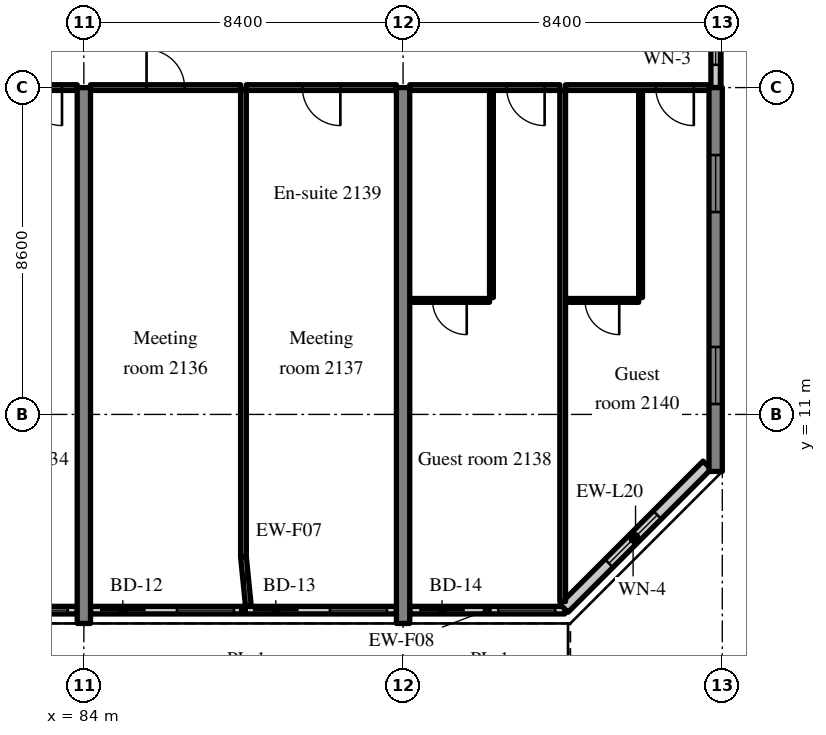
"""IFC4 building model, lengths in metres.
Left out: names, types, materials, properties, quantities, classifications, styles, units other than length and angle.
Written with IfcOpenShell. Run it as: python <this file> out.ifc"""

import sys

from ifc_helpers import new_model, si_unit, direction, frame, frame_2d, origin, place, context, subcontext, project, spatial, rectangle, extrude, source, transform, mapped, element, fill, save


model = new_model("IFC4")
c1 = context("Model", 3, precision=1e-05, world=origin(), true_north=direction((0.0, 1.0)))
c2 = subcontext(c1, "Body", "Model", "MODEL_VIEW")
j1 = project(units=[si_unit("LENGTHUNIT", "METRE"), si_unit("PLANEANGLEUNIT", "RADIAN")], contexts=[c1])
p1 = place(None, origin())
s1 = spatial("IfcSite", under=j1, at=p1, CompositionType="ELEMENT")
p2 = place(p1, origin())
s2 = spatial("IfcBuilding", under=s1, at=p2, CompositionType="ELEMENT")
p3 = place(p2, frame((0.0, 0.0, 91.4)))
s3 = spatial("IfcBuildingStorey", under=s2, at=p3, CompositionType="ELEMENT", Elevation=91.4)
m1 = source(origin(), c2, "Body", "SweptSolid", [
    extrude(rectangle(XDim=14.1, YDim=0.35, at=frame_2d((7.05, 0.0))), origin(), (0.0, 0.0, 1.0), 3.52),
])
for number, where, z_axis, x_axis in (
    (1, (84.0, 5.5, 0.0), (0.0, 0.0, 1.0), (0.0, 1.0, 0.0)),
    (2, (92.4, 5.5, 0.0), (0.0, 0.0, 1.0), (0.0, 1.0, 0.0)),
):
    element("IfcWall", number, at=place(p3, frame(where, z_axis=z_axis, x_axis=x_axis)), inside=s3, PredefinedType="SHEAR", context=c2, shape_type="MappedRepresentation", body=[
        mapped(m1, transform((0.0, 0.0, 0.0), scale=1.0)),
    ])
m2 = source(origin(), c2, "Body", "SweptSolid", [
    extrude(rectangle(XDim=10.1, YDim=0.35, at=frame_2d((5.05, 0.0))), origin(), (0.0, 0.0, 1.0), 3.52),
])
p4 = place(p3, frame((100.625, 9.5, 0.0), z_axis=(0.0, 0.0, 1.0), x_axis=(0.0, 1.0, 0.0)))
e3 = element("IfcWall", 3, at=p4, inside=s3, PredefinedType="SHEAR", context=c2, shape_type="MappedRepresentation", body=[
    mapped(m2, transform((0.0, 0.0, 0.0), scale=1.0)),
])
m3 = source(origin(), c2, "Body", "SweptSolid", [
    extrude(rectangle(XDim=1.5, YDim=1.5, at=frame_2d((0.75, 0.75))), frame((0.0, 0.185, 0.0), z_axis=(0.0, -1.0, 0.0), x_axis=(1.0, 0.0, 0.0)), (0.0, 0.0, 1.0), 0.37),
])
p5 = place(p4, frame((1.775, 0.0, 0.9)))
e4 = element("IfcOpeningElement", 4, at=p5, cuts=e3, PredefinedType="OPENING", context=c2, shape_type="MappedRepresentation", body=[
    mapped(m3, transform((0.0, 0.0, 0.0), scale=1.0)),
])
p6 = place(p4, frame((6.825, 0.0, 0.9)))
e5 = element("IfcOpeningElement", 5, at=p6, cuts=e3, PredefinedType="OPENING", context=c2, shape_type="MappedRepresentation", body=[
    mapped(m3, transform((0.0, 0.0, 0.0), scale=1.0)),
])
m4 = source(origin(), c2, "Body", "SweptSolid", [
    extrude(rectangle(XDim=8.05, YDim=0.2, at=frame_2d((4.025, 0.0))), origin(), (0.0, 0.0, 1.0), 2.82),
])
p7 = place(p3, frame((75.775, 5.85, 0.0), z_axis=(0.0, 0.0, 1.0), x_axis=(1.0, 0.0, 0.0)))
e6 = element("IfcWall", 6, at=p7, inside=s3, PredefinedType="SOLIDWALL", context=c2, shape_type="MappedRepresentation", body=[
    mapped(m4, transform((0.0, 0.0, 0.0), scale=1.0)),
])
m5 = source(origin(), c2, "Body", "SweptSolid", [
    extrude(rectangle(XDim=1.2, YDim=2.4, at=frame_2d((0.6, 1.2))), frame((0.0, 0.11, 0.0), z_axis=(0.0, -1.0, 0.0), x_axis=(1.0, 0.0, 0.0)), (0.0, 0.0, 1.0), 0.22),
])
p8 = place(p7, frame((0.25, 0.0, 0.0)))
e7 = element("IfcOpeningElement", 7, at=p8, cuts=e6, PredefinedType="OPENING", context=c2, shape_type="MappedRepresentation", body=[
    mapped(m5, transform((0.0, 0.0, 0.0), scale=1.0)),
])
m6 = source(origin(), c2, "Body", "SweptSolid", [
    extrude(rectangle(XDim=1.5, YDim=1.5, at=frame_2d((0.75, 0.75))), frame((0.0, 0.11, 0.0), z_axis=(0.0, -1.0, 0.0), x_axis=(1.0, 0.0, 0.0)), (0.0, 0.0, 1.0), 0.22),
])
p9 = place(p7, frame((2.275, 0.0, 0.9)))
e8 = element("IfcOpeningElement", 8, at=p9, cuts=e6, PredefinedType="OPENING", context=c2, shape_type="MappedRepresentation", body=[
    mapped(m6, transform((0.0, 0.0, 0.0), scale=1.0)),
])
p10 = place(p7, frame((4.275, 0.0, 0.0)))
e9 = element("IfcOpeningElement", 9, at=p10, cuts=e6, PredefinedType="OPENING", context=c2, shape_type="MappedRepresentation", body=[
    mapped(m5, transform((0.0, 0.0, 0.0), scale=1.0)),
])
p11 = place(p7, frame((6.3, 0.0, 0.9)))
e10 = element("IfcOpeningElement", 10, at=p11, cuts=e6, PredefinedType="OPENING", context=c2, shape_type="MappedRepresentation", body=[
    mapped(m6, transform((0.0, 0.0, 0.0), scale=1.0)),
])
p12 = place(p3, frame((84.175, 5.85, 0.0), z_axis=(0.0, 0.0, 1.0), x_axis=(1.0, 0.0, 0.0)))
e11 = element("IfcWall", 11, at=p12, inside=s3, PredefinedType="SOLIDWALL", context=c2, shape_type="MappedRepresentation", body=[
    mapped(m4, transform((0.0, 0.0, 0.0), scale=1.0)),
])
p13 = place(p12, frame((0.25, 0.0, 0.0)))
e12 = element("IfcOpeningElement", 12, at=p13, cuts=e11, PredefinedType="OPENING", context=c2, shape_type="MappedRepresentation", body=[
    mapped(m5, transform((0.0, 0.0, 0.0), scale=1.0)),
])
p14 = place(p12, frame((2.275, 0.0, 0.9)))
e13 = element("IfcOpeningElement", 13, at=p14, cuts=e11, PredefinedType="OPENING", context=c2, shape_type="MappedRepresentation", body=[
    mapped(m6, transform((0.0, 0.0, 0.0), scale=1.0)),
])
p15 = place(p12, frame((4.275, 0.0, 0.0)))
e14 = element("IfcOpeningElement", 14, at=p15, cuts=e11, PredefinedType="OPENING", context=c2, shape_type="MappedRepresentation", body=[
    mapped(m5, transform((0.0, 0.0, 0.0), scale=1.0)),
])
p16 = place(p12, frame((6.3, 0.0, 0.9)))
e15 = element("IfcOpeningElement", 15, at=p16, cuts=e11, PredefinedType="OPENING", context=c2, shape_type="MappedRepresentation", body=[
    mapped(m6, transform((0.0, 0.0, 0.0), scale=1.0)),
])
m7 = source(origin(), c2, "Body", "SweptSolid", [
    extrude(rectangle(XDim=4.08, YDim=0.2, at=frame_2d((2.04, 0.0))), origin(), (0.0, 0.0, 1.0), 2.82),
])
p17 = place(p3, frame((92.575, 5.85, 0.0), z_axis=(0.0, 0.0, 1.0), x_axis=(1.0, 0.0, 0.0)))
e16 = element("IfcWall", 16, at=p17, inside=s3, PredefinedType="SOLIDWALL", context=c2, shape_type="MappedRepresentation", body=[
    mapped(m7, transform((0.0, 0.0, 0.0), scale=1.0)),
])
p18 = place(p17, frame((0.25, 0.0, 0.0)))
e17 = element("IfcOpeningElement", 17, at=p18, cuts=e16, PredefinedType="OPENING", context=c2, shape_type="MappedRepresentation", body=[
    mapped(m5, transform((0.0, 0.0, 0.0), scale=1.0)),
])
p19 = place(p17, frame((2.33, 0.0, 0.9)))
e18 = element("IfcOpeningElement", 18, at=p19, cuts=e16, PredefinedType="OPENING", context=c2, shape_type="MappedRepresentation", body=[
    mapped(m6, transform((0.0, 0.0, 0.0), scale=1.0)),
])
m8 = source(origin(), c2, "Body", "SweptSolid", [
    extrude(rectangle(XDim=5.326, YDim=0.3, at=frame_2d((2.663, 0.0))), origin(), (0.0, 0.0, 1.0), 3.52),
])
p20 = place(p3, frame((96.634, 5.9, 0.0), z_axis=(0.0, 0.0, 1.0), x_axis=(0.707083859269, 0.707129702361, 0.0)))
e19 = element("IfcWall", 19, at=p20, inside=s3, PredefinedType="SOLIDWALL", context=c2, shape_type="MappedRepresentation", body=[
    mapped(m8, transform((0.0, 0.0, 0.0), scale=1.0)),
])
m9 = source(origin(), c2, "Body", "SweptSolid", [
    extrude(rectangle(XDim=1.8, YDim=1.5, at=frame_2d((0.9, 0.75))), frame((0.0, 0.16, 0.0), z_axis=(0.0, -1.0, 0.0), x_axis=(1.0, 0.0, 0.0)), (0.0, 0.0, 1.0), 0.32),
])
p21 = place(p20, frame((1.672, 0.0, 0.9)))
e20 = element("IfcOpeningElement", 20, at=p21, cuts=e19, PredefinedType="OPENING", context=c2, shape_type="MappedRepresentation", body=[
    mapped(m9, transform((0.0, 0.0, 0.0), scale=1.0)),
])
m10 = source(origin(), c2, "Body", "SweptSolid", [
    extrude(rectangle(XDim=2.4, YDim=0.25, at=frame_2d((1.2, 0.0))), origin(), (0.0, 0.0, 1.0), 2.62),
])
p22 = place(p3, frame((100.625, 19.6, 0.0), z_axis=(0.0, 0.0, 1.0), x_axis=(0.0, 1.0, 0.0)))
e21 = element("IfcWall", 21, at=p22, inside=s3, PredefinedType="SOLIDWALL", context=c2, shape_type="MappedRepresentation", body=[
    mapped(m10, transform((0.0, 0.0, 0.0), scale=1.0)),
])
m11 = source(origin(), c2, "Body", "SweptSolid", [
    extrude(rectangle(XDim=1.2, YDim=1.5, at=frame_2d((0.6, 0.75))), frame((0.0, 0.135, 0.0), z_axis=(0.0, -1.0, 0.0), x_axis=(1.0, 0.0, 0.0)), (0.0, 0.0, 1.0), 0.27),
])
p23 = place(p22, frame((0.6, 0.0, 0.9)))
e22 = element("IfcOpeningElement", 22, at=p23, cuts=e21, PredefinedType="OPENING", context=c2, shape_type="MappedRepresentation", body=[
    mapped(m11, transform((0.0, 0.0, 0.0), scale=1.0)),
])
m12 = source(origin(), c2, "Body", "SweptSolid", [
    extrude(rectangle(XDim=3.95, YDim=0.15, at=frame_2d((1.975, 0.0))), origin(), (0.0, 0.0, 1.0), 2.82),
])
p24 = place(p3, frame((79.875, 19.6, 0.0), z_axis=(0.0, 0.0, 1.0), x_axis=(1.0, 0.0, 0.0)))
e23 = element("IfcWall", 23, at=p24, inside=s3, PredefinedType="PARTITIONING", context=c2, shape_type="MappedRepresentation", body=[
    mapped(m12, transform((0.0, 0.0, 0.0), scale=1.0)),
])
m13 = source(origin(), c2, "Body", "SweptSolid", [
    extrude(rectangle(XDim=1.0, YDim=2.1, at=frame_2d((0.5, 1.05))), frame((0.0, 0.085, 0.0), z_axis=(0.0, -1.0, 0.0), x_axis=(1.0, 0.0, 0.0)), (0.0, 0.0, 1.0), 0.17),
])
p25 = place(p24, frame((2.55, 0.0, 0.0)))
e24 = element("IfcOpeningElement", 24, at=p25, cuts=e23, PredefinedType="OPENING", context=c2, shape_type="MappedRepresentation", body=[
    mapped(m13, transform((0.0, 0.0, 0.0), scale=1.0)),
])
p26 = place(p3, frame((84.175, 19.6, 0.0), z_axis=(0.0, 0.0, 1.0), x_axis=(1.0, 0.0, 0.0)))
e25 = element("IfcWall", 25, at=p26, inside=s3, PredefinedType="PARTITIONING", context=c2, shape_type="MappedRepresentation", body=[
    mapped(m12, transform((0.0, 0.0, 0.0), scale=1.0)),
])
p27 = place(p26, frame((1.475, 0.0, 0.0)))
e26 = element("IfcOpeningElement", 26, at=p27, cuts=e25, PredefinedType="OPENING", context=c2, shape_type="MappedRepresentation", body=[
    mapped(m13, transform((0.0, 0.0, 0.0), scale=1.0)),
])
m14 = source(origin(), c2, "Body", "SweptSolid", [
    extrude(rectangle(XDim=3.95, YDim=0.15, at=frame_2d((1.975, 0.0))), origin(), (0.0, 0.0, 1.0), 2.82),
])
p28 = place(p3, frame((88.275, 19.6, 0.0), z_axis=(0.0, 0.0, 1.0), x_axis=(1.0, 0.0, 0.0)))
e27 = element("IfcWall", 27, at=p28, inside=s3, PredefinedType="PARTITIONING", context=c2, shape_type="MappedRepresentation", body=[
    mapped(m14, transform((0.0, 0.0, 0.0), scale=1.0)),
])
p29 = place(p28, frame((1.475, 0.0, 0.0)))
e28 = element("IfcOpeningElement", 28, at=p29, cuts=e27, PredefinedType="OPENING", context=c2, shape_type="MappedRepresentation", body=[
    mapped(m13, transform((0.0, 0.0, 0.0), scale=1.0)),
])
m15 = source(origin(), c2, "Body", "SweptSolid", [
    extrude(rectangle(XDim=12.275, YDim=0.15, at=frame_2d((6.137, 0.0))), origin(), (0.0, 0.0, 1.0), 3.52),
])
p30 = place(p3, frame((88.2, 7.25, 0.0), z_axis=(0.0, 0.0, 1.0), x_axis=(0.0, 1.0, 0.0)))
e29 = element("IfcWall", 29, at=p30, inside=s3, PredefinedType="PARTITIONING", context=c2, shape_type="MappedRepresentation", body=[
    mapped(m15, transform((0.0, 0.0, 0.0), scale=1.0)),
])
m16 = source(origin(), c2, "Body", "SweptSolid", [
    extrude(rectangle(XDim=5.45, YDim=0.1, at=frame_2d((2.725, 0.0))), origin(), (0.0, 0.0, 1.0), 3.52),
])
p31 = place(p3, frame((94.725, 14.075, 0.0), z_axis=(0.0, 0.0, 1.0), x_axis=(0.0, 1.0, 0.0)))
e30 = element("IfcWall", 30, at=p31, inside=s3, PredefinedType="PARTITIONING", context=c2, shape_type="MappedRepresentation", body=[
    mapped(m16, transform((0.0, 0.0, 0.0), scale=1.0)),
])
m17 = source(origin(), c2, "Body", "SweptSolid", [
    extrude(rectangle(XDim=2.1, YDim=0.1, at=frame_2d((1.05, 0.0))), origin(), (0.0, 0.0, 1.0), 3.52),
])
p32 = place(p3, frame((92.575, 14.0, 0.0), z_axis=(0.0, 0.0, 1.0), x_axis=(1.0, 0.0, 0.0)))
e31 = element("IfcWall", 31, at=p32, inside=s3, PredefinedType="PARTITIONING", context=c2, shape_type="MappedRepresentation", body=[
    mapped(m17, transform((0.0, 0.0, 0.0), scale=1.0)),
])
m18 = source(origin(), c2, "Body", "SweptSolid", [
    extrude(rectangle(XDim=0.9, YDim=2.1, at=frame_2d((0.45, 1.05))), frame((0.0, 0.06, 0.0), z_axis=(0.0, -1.0, 0.0), x_axis=(1.0, 0.0, 0.0)), (0.0, 0.0, 1.0), 0.12),
])
p33 = place(p32, frame((0.6, 0.0, 0.0)))
e32 = element("IfcOpeningElement", 32, at=p33, cuts=e31, PredefinedType="OPENING", context=c2, shape_type="MappedRepresentation", body=[
    mapped(m18, transform((0.0, 0.0, 0.0), scale=1.0)),
])
p34 = place(p3, frame((92.575, 19.6, 0.0), z_axis=(0.0, 0.0, 1.0), x_axis=(1.0, 0.0, 0.0)))
e33 = element("IfcWall", 33, at=p34, inside=s3, PredefinedType="PARTITIONING", context=c2, shape_type="MappedRepresentation", body=[
    mapped(m12, transform((0.0, 0.0, 0.0), scale=1.0)),
])
p35 = place(p34, frame((2.55, 0.0, 0.0)))
e34 = element("IfcOpeningElement", 34, at=p35, cuts=e33, PredefinedType="OPENING", context=c2, shape_type="MappedRepresentation", body=[
    mapped(m13, transform((0.0, 0.0, 0.0), scale=1.0)),
])
p36 = place(p3, frame((98.65, 14.075, 0.0), z_axis=(0.0, 0.0, 1.0), x_axis=(0.0, 1.0, 0.0)))
e35 = element("IfcWall", 35, at=p36, inside=s3, PredefinedType="PARTITIONING", context=c2, shape_type="MappedRepresentation", body=[
    mapped(m16, transform((0.0, 0.0, 0.0), scale=1.0)),
])
m19 = source(origin(), c2, "Body", "SweptSolid", [
    extrude(rectangle(XDim=1.925, YDim=0.1, at=frame_2d((0.962, 0.0))), origin(), (0.0, 0.0, 1.0), 3.52),
])
p37 = place(p3, frame((96.675, 14.0, 0.0), z_axis=(0.0, 0.0, 1.0), x_axis=(1.0, 0.0, 0.0)))
e36 = element("IfcWall", 36, at=p37, inside=s3, PredefinedType="PARTITIONING", context=c2, shape_type="MappedRepresentation", body=[
    mapped(m19, transform((0.0, 0.0, 0.0), scale=1.0)),
])
p38 = place(p37, frame((0.513, 0.0, 0.0)))
e37 = element("IfcOpeningElement", 37, at=p38, cuts=e36, PredefinedType="OPENING", context=c2, shape_type="MappedRepresentation", body=[
    mapped(m18, transform((0.0, 0.0, 0.0), scale=1.0)),
])
m20 = source(origin(), c2, "Body", "SweptSolid", [
    extrude(rectangle(XDim=3.775, YDim=0.15, at=frame_2d((1.887, 0.0))), origin(), (0.0, 0.0, 1.0), 2.82),
])
p39 = place(p3, frame((96.675, 19.6, 0.0), z_axis=(0.0, 0.0, 1.0), x_axis=(1.0, 0.0, 0.0)))
e38 = element("IfcWall", 38, at=p39, inside=s3, PredefinedType="PARTITIONING", context=c2, shape_type="MappedRepresentation", body=[
    mapped(m20, transform((0.0, 0.0, 0.0), scale=1.0)),
])
p40 = place(p39, frame((2.375, 0.0, 0.0)))
e39 = element("IfcOpeningElement", 39, at=p40, cuts=e38, PredefinedType="OPENING", context=c2, shape_type="MappedRepresentation", body=[
    mapped(m13, transform((0.0, 0.0, 0.0), scale=1.0)),
])
m21 = source(origin(), c2, "Body", "SweptSolid", [
    extrude(rectangle(XDim=13.447, YDim=0.15, at=frame_2d((6.724, 0.0))), origin(), (0.0, 0.0, 1.0), 3.52),
])
p41 = place(p3, frame((96.6, 6.078, 0.0), z_axis=(0.0, 0.0, 1.0), x_axis=(0.0, 1.0, 0.0)))
e40 = element("IfcWall", 40, at=p41, inside=s3, PredefinedType="PARTITIONING", context=c2, shape_type="MappedRepresentation", body=[
    mapped(m21, transform((0.0, 0.0, 0.0), scale=1.0)),
])
m22 = source(origin(), c2, "Body", "SweptSolid", [
    extrude(rectangle(XDim=1.307, YDim=0.15, at=frame_2d((0.653, 0.0))), origin(), (0.0, 0.0, 1.0), 3.52),
])
p42 = place(p3, frame((88.33, 5.95, 0.0), z_axis=(0.0, 0.0, 1.0), x_axis=(-0.099596223396, 0.99502793543, 0.0)))
e41 = element("IfcWall", 41, at=p42, inside=s3, PredefinedType="PARTITIONING", context=c2, shape_type="MappedRepresentation", body=[
    mapped(m22, transform((0.0, 0.0, 0.0), scale=1.0)),
])
m23 = source(origin(), c2, "Body", "SweptSolid", [
    extrude(rectangle(XDim=1.5, YDim=1.5, at=frame_2d((0.75, 0.75))), frame((0.0, 0.03, 0.0), z_axis=(0.0, -1.0, 0.0), x_axis=(1.0, 0.0, 0.0)), (0.0, 0.0, 1.0), 0.06),
])
p43 = place(p11, origin())
e42 = element("IfcWindow", 42, at=p43, inside=s3, PartitioningType="SINGLE_PANEL", PredefinedType="WINDOW", context=c2, shape_type="MappedRepresentation", body=[
    mapped(m23, transform((0.0, 0.0, 0.0), scale=1.0)),
])
fill(e10, e42)
m24 = source(origin(), c2, "Body", "SweptSolid", [
    extrude(rectangle(XDim=1.2, YDim=2.4, at=frame_2d((0.6, 1.2))), frame((0.0, 0.025, 0.0), z_axis=(0.0, -1.0, 0.0), x_axis=(1.0, 0.0, 0.0)), (0.0, 0.0, 1.0), 0.05),
])
p44 = place(p13, origin())
e43 = element("IfcDoor", 43, at=p44, inside=s3, OperationType="SLIDING_TO_RIGHT", PredefinedType="DOOR", context=c2, shape_type="MappedRepresentation", body=[
    mapped(m24, transform((0.0, 0.0, 0.0), scale=1.0)),
])
fill(e12, e43)
p45 = place(p14, origin())
e44 = element("IfcWindow", 44, at=p45, inside=s3, PartitioningType="SINGLE_PANEL", PredefinedType="WINDOW", context=c2, shape_type="MappedRepresentation", body=[
    mapped(m23, transform((0.0, 0.0, 0.0), scale=1.0)),
])
fill(e13, e44)
p46 = place(p15, origin())
e45 = element("IfcDoor", 45, at=p46, inside=s3, OperationType="SLIDING_TO_LEFT", PredefinedType="DOOR", context=c2, shape_type="MappedRepresentation", body=[
    mapped(m24, transform((0.0, 0.0, 0.0), scale=1.0)),
])
fill(e14, e45)
p47 = place(p16, origin())
e46 = element("IfcWindow", 46, at=p47, inside=s3, PartitioningType="SINGLE_PANEL", PredefinedType="WINDOW", context=c2, shape_type="MappedRepresentation", body=[
    mapped(m23, transform((0.0, 0.0, 0.0), scale=1.0)),
])
fill(e15, e46)
p48 = place(p18, origin())
e47 = element("IfcDoor", 47, at=p48, inside=s3, OperationType="SLIDING_TO_RIGHT", PredefinedType="DOOR", context=c2, shape_type="MappedRepresentation", body=[
    mapped(m24, transform((0.0, 0.0, 0.0), scale=1.0)),
])
fill(e17, e47)
p49 = place(p19, origin())
e48 = element("IfcWindow", 48, at=p49, inside=s3, PartitioningType="SINGLE_PANEL", PredefinedType="WINDOW", context=c2, shape_type="MappedRepresentation", body=[
    mapped(m23, transform((0.0, 0.0, 0.0), scale=1.0)),
])
fill(e18, e48)
m25 = source(origin(), c2, "Body", "SweptSolid", [
    extrude(rectangle(XDim=1.8, YDim=1.5, at=frame_2d((0.9, 0.75))), frame((0.0, 0.03, 0.0), z_axis=(0.0, -1.0, 0.0), x_axis=(1.0, 0.0, 0.0)), (0.0, 0.0, 1.0), 0.06),
])
p50 = place(p21, origin())
e49 = element("IfcWindow", 49, at=p50, inside=s3, PartitioningType="SINGLE_PANEL", PredefinedType="WINDOW", context=c2, shape_type="MappedRepresentation", body=[
    mapped(m25, transform((0.0, 0.0, 0.0), scale=1.0)),
])
fill(e20, e49)
p51 = place(p5, origin())
e50 = element("IfcWindow", 50, at=p51, inside=s3, PartitioningType="SINGLE_PANEL", PredefinedType="WINDOW", context=c2, shape_type="MappedRepresentation", body=[
    mapped(m23, transform((0.0, 0.0, 0.0), scale=1.0)),
])
fill(e4, e50)
p52 = place(p6, origin())
e51 = element("IfcWindow", 51, at=p52, inside=s3, PartitioningType="SINGLE_PANEL", PredefinedType="WINDOW", context=c2, shape_type="MappedRepresentation", body=[
    mapped(m23, transform((0.0, 0.0, 0.0), scale=1.0)),
])
fill(e5, e51)
m26 = source(origin(), c2, "Body", "SweptSolid", [
    extrude(rectangle(XDim=1.2, YDim=1.5, at=frame_2d((0.6, 0.75))), frame((0.0, 0.03, 0.0), z_axis=(0.0, -1.0, 0.0), x_axis=(1.0, 0.0, 0.0)), (0.0, 0.0, 1.0), 0.06),
])
p53 = place(p23, origin())
e52 = element("IfcWindow", 52, at=p53, inside=s3, PartitioningType="SINGLE_PANEL", PredefinedType="WINDOW", context=c2, shape_type="MappedRepresentation", body=[
    mapped(m26, transform((0.0, 0.0, 0.0), scale=1.0)),
])
fill(e22, e52)
m27 = source(origin(), c2, "Body", "SweptSolid", [
    extrude(rectangle(XDim=1.0, YDim=2.1, at=frame_2d((0.5, 1.05))), frame((0.0, 0.025, 0.0), z_axis=(0.0, -1.0, 0.0), x_axis=(1.0, 0.0, 0.0)), (0.0, 0.0, 1.0), 0.05),
])
p54 = place(p25, origin())
e53 = element("IfcDoor", 53, at=p54, inside=s3, OperationType="SINGLE_SWING_RIGHT", PredefinedType="DOOR", context=c2, shape_type="MappedRepresentation", body=[
    mapped(m27, transform((0.0, 0.0, 0.0), scale=1.0)),
])
fill(e24, e53)
p55 = place(p27, origin())
e54 = element("IfcDoor", 54, at=p55, inside=s3, OperationType="SINGLE_SWING_LEFT", PredefinedType="DOOR", context=c2, shape_type="MappedRepresentation", body=[
    mapped(m27, transform((0.0, 0.0, 0.0), scale=1.0)),
])
fill(e26, e54)
p56 = place(p29, origin())
e55 = element("IfcDoor", 55, at=p56, inside=s3, OperationType="SINGLE_SWING_RIGHT", PredefinedType="DOOR", context=c2, shape_type="MappedRepresentation", body=[
    mapped(m27, transform((0.0, 0.0, 0.0), scale=1.0)),
])
fill(e28, e55)
m28 = source(origin(), c2, "Body", "SweptSolid", [
    extrude(rectangle(XDim=0.9, YDim=2.1, at=frame_2d((0.45, 1.05))), frame((0.0, 0.025, 0.0), z_axis=(0.0, -1.0, 0.0), x_axis=(1.0, 0.0, 0.0)), (0.0, 0.0, 1.0), 0.05),
])
p57 = place(p33, origin())
e56 = element("IfcDoor", 56, at=p57, inside=s3, OperationType="SINGLE_SWING_RIGHT", PredefinedType="DOOR", context=c2, shape_type="MappedRepresentation", body=[
    mapped(m28, transform((0.0, 0.0, 0.0), scale=1.0)),
])
fill(e32, e56)
p58 = place(p35, origin())
e57 = element("IfcDoor", 57, at=p58, inside=s3, OperationType="SINGLE_SWING_RIGHT", PredefinedType="DOOR", context=c2, shape_type="MappedRepresentation", body=[
    mapped(m27, transform((0.0, 0.0, 0.0), scale=1.0)),
])
fill(e34, e57)
p59 = place(p38, origin())
e58 = element("IfcDoor", 58, at=p59, inside=s3, OperationType="SINGLE_SWING_RIGHT", PredefinedType="DOOR", context=c2, shape_type="MappedRepresentation", body=[
    mapped(m28, transform((0.0, 0.0, 0.0), scale=1.0)),
])
fill(e37, e58)
p60 = place(p40, origin())
e59 = element("IfcDoor", 59, at=p60, inside=s3, OperationType="SINGLE_SWING_RIGHT", PredefinedType="DOOR", context=c2, shape_type="MappedRepresentation", body=[
    mapped(m27, transform((0.0, 0.0, 0.0), scale=1.0)),
])
fill(e39, e59)
save(model, sys.argv[1])
